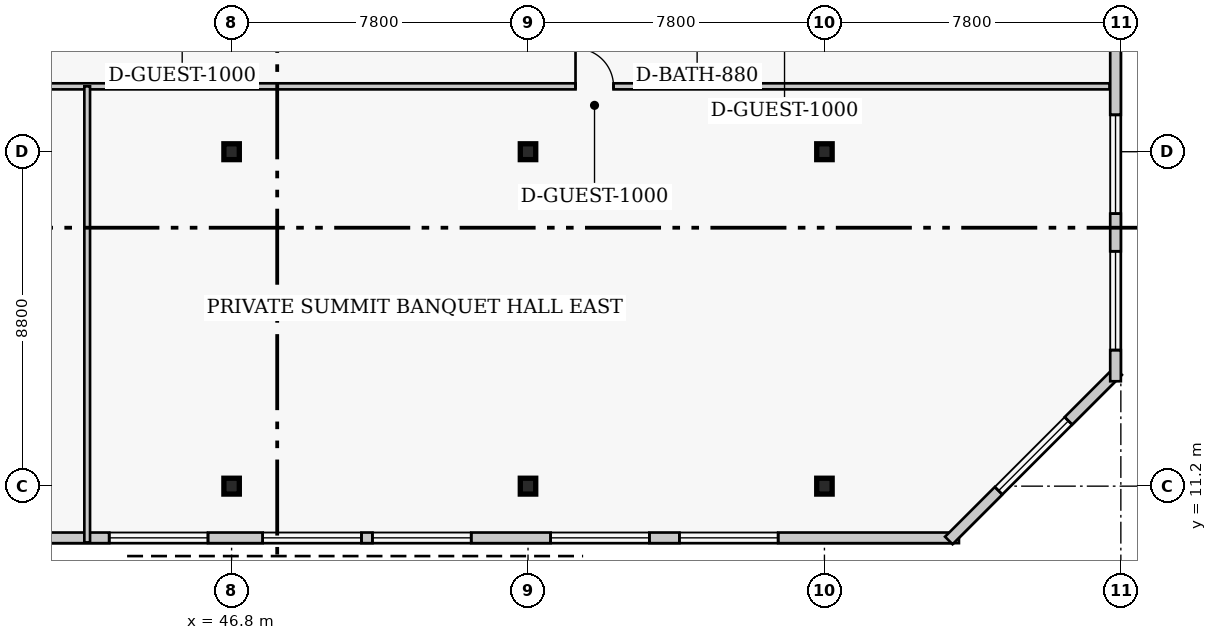
"""IFC4 building model, lengths in metres.
Left out: names, types, materials, properties, quantities, classifications, styles, units other than length and angle.
Written with IfcOpenShell. Run it as: python <this file> out.ifc"""

import sys

from ifc_helpers import new_model, si_unit, direction, frame, frame_2d, origin, origin_2d, place, context, subcontext, project, spatial, rectangle, i_section, extrude, element, fill, save


model = new_model("IFC4")
c1 = context("Model", 3, precision=1e-05, world=origin(), true_north=direction((0.0, 1.0)))
c2 = subcontext(c1, "Body", "Model", "MODEL_VIEW")
j1 = project(units=[si_unit("LENGTHUNIT", "METRE"), si_unit("PLANEANGLEUNIT", "RADIAN")], contexts=[c1])
p1 = place(None, origin())
s1 = spatial("IfcSite", under=j1, at=p1, CompositionType="ELEMENT")
p2 = place(p1, origin())
s2 = spatial("IfcBuilding", under=s1, at=p2, CompositionType="ELEMENT")
p3 = place(p2, frame((0.0, 0.0, 293.4)))
s3 = spatial("IfcBuildingStorey", under=s2, at=p3, CompositionType="ELEMENT", Elevation=293.4)
for number, where, z_axis, x_axis in (
    (1, (46.8, 11.2, 0.0), (0.0, 0.0, 1.0), (1.0, 0.0, 0.0)),
    (2, (46.8, 20.0, 0.0), (0.0, 0.0, 1.0), (1.0, 0.0, 0.0)),
    (3, (54.6, 11.2, 0.0), (0.0, 0.0, 1.0), (1.0, 0.0, 0.0)),
    (4, (54.6, 20.0, 0.0), (0.0, 0.0, 1.0), (1.0, 0.0, 0.0)),
    (5, (62.4, 11.2, 0.0), (0.0, 0.0, 1.0), (1.0, 0.0, 0.0)),
    (6, (62.4, 20.0, 0.0), (0.0, 0.0, 1.0), (1.0, 0.0, 0.0)),
):
    element("IfcColumn", number, at=place(p3, frame(where, z_axis=z_axis, x_axis=x_axis)), inside=s3, PredefinedType="COLUMN", context=c2, shape_type="SweptSolid", body=[
        extrude(i_section(OverallWidth=0.406, OverallDepth=0.417, WebThickness=0.03, FlangeThickness=0.048, FilletRadius=0.017, at=origin_2d()), origin(), (0.0, 0.0, 1.0), 4.0),
    ])
p4 = place(p3, frame((41.71, 9.84, 0.0), z_axis=(0.0, 0.0, 1.0), x_axis=(1.0, 0.0, 0.0)))
e7 = element("IfcWall", 7, at=p4, inside=s3, PredefinedType="SOLIDWALL", context=c2, shape_type="SweptSolid", body=[
    extrude(rectangle(XDim=24.23, YDim=0.28, at=frame_2d((12.115, 0.0))), origin(), (0.0, 0.0, 1.0), 3.71),
])
p5 = place(p4, frame((1.869, 0.0, 0.65)))
e8 = element("IfcOpeningElement", 8, at=p5, cuts=e7, PredefinedType="OPENING", context=c2, shape_type="SweptSolid", body=[
    extrude(rectangle(XDim=2.6, YDim=2.2, at=frame_2d((1.3, 1.1))), frame((0.0, 0.15, 0.0), z_axis=(0.0, -1.0, 0.0), x_axis=(1.0, 0.0, 0.0)), (0.0, 0.0, 1.0), 0.3),
])
p6 = place(p4, frame((5.907, 0.0, 0.65)))
e9 = element("IfcOpeningElement", 9, at=p6, cuts=e7, PredefinedType="OPENING", context=c2, shape_type="SweptSolid", body=[
    extrude(rectangle(XDim=2.6, YDim=2.2, at=frame_2d((1.3, 1.1))), frame((0.0, 0.15, 0.0), z_axis=(0.0, -1.0, 0.0), x_axis=(1.0, 0.0, 0.0)), (0.0, 0.0, 1.0), 0.3),
])
p7 = place(p4, frame((8.796, 0.0, 0.65)))
e10 = element("IfcOpeningElement", 10, at=p7, cuts=e7, PredefinedType="OPENING", context=c2, shape_type="SweptSolid", body=[
    extrude(rectangle(XDim=2.6, YDim=2.2, at=frame_2d((1.3, 1.1))), frame((0.0, 0.15, 0.0), z_axis=(0.0, -1.0, 0.0), x_axis=(1.0, 0.0, 0.0)), (0.0, 0.0, 1.0), 0.3),
])
p8 = place(p4, frame((13.484, 0.0, 0.65)))
e11 = element("IfcOpeningElement", 11, at=p8, cuts=e7, PredefinedType="OPENING", context=c2, shape_type="SweptSolid", body=[
    extrude(rectangle(XDim=2.6, YDim=2.2, at=frame_2d((1.3, 1.1))), frame((0.0, 0.15, 0.0), z_axis=(0.0, -1.0, 0.0), x_axis=(1.0, 0.0, 0.0)), (0.0, 0.0, 1.0), 0.3),
])
p9 = place(p4, frame((16.873, 0.0, 0.65)))
e12 = element("IfcOpeningElement", 12, at=p9, cuts=e7, PredefinedType="OPENING", context=c2, shape_type="SweptSolid", body=[
    extrude(rectangle(XDim=2.6, YDim=2.2, at=frame_2d((1.3, 1.1))), frame((0.0, 0.15, 0.0), z_axis=(0.0, -1.0, 0.0), x_axis=(1.0, 0.0, 0.0)), (0.0, 0.0, 1.0), 0.3),
])
p10 = place(p3, frame((65.673, 9.771, 0.0), z_axis=(0.0, 0.0, 1.0), x_axis=(0.707126148934, 0.707087412908, 0.0)))
e13 = element("IfcWall", 13, at=p10, inside=s3, PredefinedType="SOLIDWALL", context=c2, shape_type="SweptSolid", body=[
    extrude(rectangle(XDim=6.303, YDim=0.28, at=frame_2d((3.151, 0.0))), origin(), (0.0, 0.0, 1.0), 3.71),
])
p11 = place(p10, frame((1.851, 0.0, 0.65)))
e14 = element("IfcOpeningElement", 14, at=p11, cuts=e13, PredefinedType="OPENING", context=c2, shape_type="SweptSolid", body=[
    extrude(rectangle(XDim=2.6, YDim=2.2, at=frame_2d((1.3, 1.1))), frame((0.0, 0.15, 0.0), z_axis=(0.0, -1.0, 0.0), x_axis=(1.0, 0.0, 0.0)), (0.0, 0.0, 1.0), 0.3),
])
p12 = place(p3, frame((70.06, 13.96, 0.0), z_axis=(0.0, 0.0, 1.0), x_axis=(0.0, 1.0, 0.0)))
e15 = element("IfcWall", 15, at=p12, inside=s3, PredefinedType="SOLIDWALL", context=c2, shape_type="SweptSolid", body=[
    extrude(rectangle(XDim=29.68, YDim=0.28, at=frame_2d((14.84, 0.0))), origin(), (0.0, 0.0, 1.0), 3.71),
])
p13 = place(p12, frame((0.82, 0.0, 0.65)))
e16 = element("IfcOpeningElement", 16, at=p13, cuts=e15, PredefinedType="OPENING", context=c2, shape_type="SweptSolid", body=[
    extrude(rectangle(XDim=2.6, YDim=2.2, at=frame_2d((1.3, 1.1))), frame((0.0, 0.15, 0.0), z_axis=(0.0, -1.0, 0.0), x_axis=(1.0, 0.0, 0.0)), (0.0, 0.0, 1.0), 0.3),
])
p14 = place(p12, frame((4.41, 0.0, 0.65)))
e17 = element("IfcOpeningElement", 17, at=p14, cuts=e15, PredefinedType="OPENING", context=c2, shape_type="SweptSolid", body=[
    extrude(rectangle(XDim=2.6, YDim=2.2, at=frame_2d((1.3, 1.1))), frame((0.0, 0.15, 0.0), z_axis=(0.0, -1.0, 0.0), x_axis=(1.0, 0.0, 0.0)), (0.0, 0.0, 1.0), 0.3),
])
p15 = place(p12, frame((10.45, 0.0, 0.65)))
e18 = element("IfcOpeningElement", 18, at=p15, cuts=e15, PredefinedType="OPENING", context=c2, shape_type="SweptSolid", body=[
    extrude(rectangle(XDim=2.6, YDim=2.2, at=frame_2d((1.3, 1.1))), frame((0.0, 0.15, 0.0), z_axis=(0.0, -1.0, 0.0), x_axis=(1.0, 0.0, 0.0)), (0.0, 0.0, 1.0), 0.3),
])
p16 = place(p12, frame((13.54, 0.0, 0.65)))
e19 = element("IfcOpeningElement", 19, at=p16, cuts=e15, PredefinedType="OPENING", context=c2, shape_type="SweptSolid", body=[
    extrude(rectangle(XDim=2.6, YDim=2.2, at=frame_2d((1.3, 1.1))), frame((0.0, 0.15, 0.0), z_axis=(0.0, -1.0, 0.0), x_axis=(1.0, 0.0, 0.0)), (0.0, 0.0, 1.0), 0.3),
])
p17 = place(p12, frame((17.78, 0.0, 0.65)))
e20 = element("IfcOpeningElement", 20, at=p17, cuts=e15, PredefinedType="OPENING", context=c2, shape_type="SweptSolid", body=[
    extrude(rectangle(XDim=2.6, YDim=2.2, at=frame_2d((1.3, 1.1))), frame((0.0, 0.15, 0.0), z_axis=(0.0, -1.0, 0.0), x_axis=(1.0, 0.0, 0.0)), (0.0, 0.0, 1.0), 0.3),
])
p18 = place(p12, frame((22.02, 0.0, 0.65)))
e21 = element("IfcOpeningElement", 21, at=p18, cuts=e15, PredefinedType="OPENING", context=c2, shape_type="SweptSolid", body=[
    extrude(rectangle(XDim=2.6, YDim=2.2, at=frame_2d((1.3, 1.1))), frame((0.0, 0.15, 0.0), z_axis=(0.0, -1.0, 0.0), x_axis=(1.0, 0.0, 0.0)), (0.0, 0.0, 1.0), 0.3),
])
p19 = place(p12, frame((26.26, 0.0, 0.65)))
e22 = element("IfcOpeningElement", 22, at=p19, cuts=e15, PredefinedType="OPENING", context=c2, shape_type="SweptSolid", body=[
    extrude(rectangle(XDim=2.6, YDim=2.2, at=frame_2d((1.3, 1.1))), frame((0.0, 0.15, 0.0), z_axis=(0.0, -1.0, 0.0), x_axis=(1.0, 0.0, 0.0)), (0.0, 0.0, 1.0), 0.3),
])
p20 = place(p3, frame((8.1, 21.72, 0.0), z_axis=(0.0, 0.0, 1.0), x_axis=(1.0, 0.0, 0.0)))
e23 = element("IfcWall", 23, at=p20, inside=s3, PredefinedType="PARTITIONING", context=c2, shape_type="SweptSolid", body=[
    extrude(rectangle(XDim=61.8, YDim=0.16, at=frame_2d((30.9, 0.0))), origin(), (0.0, 0.0, 1.0), 3.71),
])
p21 = place(p20, frame((8.8, 0.0, 0.0)))
e24 = element("IfcOpeningElement", 24, at=p21, cuts=e23, PredefinedType="OPENING", context=c2, shape_type="SweptSolid", body=[
    extrude(rectangle(XDim=1.0, YDim=2.15, at=frame_2d((0.5, 1.075))), frame((0.0, 0.09, 0.0), z_axis=(0.0, -1.0, 0.0), x_axis=(1.0, 0.0, 0.0)), (0.0, 0.0, 1.0), 0.18),
])
p22 = place(p20, frame((26.15, 0.0, 0.0)))
e25 = element("IfcOpeningElement", 25, at=p22, cuts=e23, PredefinedType="OPENING", context=c2, shape_type="SweptSolid", body=[
    extrude(rectangle(XDim=1.0, YDim=2.15, at=frame_2d((0.5, 1.075))), frame((0.0, 0.09, 0.0), z_axis=(0.0, -1.0, 0.0), x_axis=(1.0, 0.0, 0.0)), (0.0, 0.0, 1.0), 0.18),
])
p23 = place(p20, frame((47.75, 0.0, 0.0)))
e26 = element("IfcOpeningElement", 26, at=p23, cuts=e23, PredefinedType="OPENING", context=c2, shape_type="SweptSolid", body=[
    extrude(rectangle(XDim=1.0, YDim=2.15, at=frame_2d((0.5, 1.075))), frame((0.0, 0.09, 0.0), z_axis=(0.0, -1.0, 0.0), x_axis=(1.0, 0.0, 0.0)), (0.0, 0.0, 1.0), 0.18),
])
p24 = place(p3, frame((43.0, 9.72, 0.0), z_axis=(0.0, 0.0, 1.0), x_axis=(0.0, 1.0, 0.0)))
e27 = element("IfcWall", 27, at=p24, inside=s3, PredefinedType="PARTITIONING", context=c2, shape_type="SweptSolid", body=[
    extrude(rectangle(XDim=12.0, YDim=0.15, at=frame_2d((6.0, 0.0))), origin(), (0.0, 0.0, 1.0), 3.71),
])
p25 = place(p5, origin())
e28 = element("IfcWindow", 28, at=p25, inside=s3, PartitioningType="SINGLE_PANEL", PredefinedType="WINDOW", context=c2, shape_type="SweptSolid", body=[
    extrude(rectangle(XDim=2.6, YDim=2.2, at=frame_2d((1.3, 1.1))), frame((0.0, 0.03, 0.0), z_axis=(0.0, -1.0, 0.0), x_axis=(1.0, 0.0, 0.0)), (0.0, 0.0, 1.0), 0.06),
])
fill(e8, e28)
p26 = place(p6, origin())
e29 = element("IfcWindow", 29, at=p26, inside=s3, PartitioningType="SINGLE_PANEL", PredefinedType="WINDOW", context=c2, shape_type="SweptSolid", body=[
    extrude(rectangle(XDim=2.6, YDim=2.2, at=frame_2d((1.3, 1.1))), frame((0.0, 0.03, 0.0), z_axis=(0.0, -1.0, 0.0), x_axis=(1.0, 0.0, 0.0)), (0.0, 0.0, 1.0), 0.06),
])
fill(e9, e29)
p27 = place(p7, origin())
e30 = element("IfcWindow", 30, at=p27, inside=s3, PartitioningType="SINGLE_PANEL", PredefinedType="WINDOW", context=c2, shape_type="SweptSolid", body=[
    extrude(rectangle(XDim=2.6, YDim=2.2, at=frame_2d((1.3, 1.1))), frame((0.0, 0.03, 0.0), z_axis=(0.0, -1.0, 0.0), x_axis=(1.0, 0.0, 0.0)), (0.0, 0.0, 1.0), 0.06),
])
fill(e10, e30)
p28 = place(p8, origin())
e31 = element("IfcWindow", 31, at=p28, inside=s3, PartitioningType="SINGLE_PANEL", PredefinedType="WINDOW", context=c2, shape_type="SweptSolid", body=[
    extrude(rectangle(XDim=2.6, YDim=2.2, at=frame_2d((1.3, 1.1))), frame((0.0, 0.03, 0.0), z_axis=(0.0, -1.0, 0.0), x_axis=(1.0, 0.0, 0.0)), (0.0, 0.0, 1.0), 0.06),
])
fill(e11, e31)
p29 = place(p9, origin())
e32 = element("IfcWindow", 32, at=p29, inside=s3, PartitioningType="SINGLE_PANEL", PredefinedType="WINDOW", context=c2, shape_type="SweptSolid", body=[
    extrude(rectangle(XDim=2.6, YDim=2.2, at=frame_2d((1.3, 1.1))), frame((0.0, 0.03, 0.0), z_axis=(0.0, -1.0, 0.0), x_axis=(1.0, 0.0, 0.0)), (0.0, 0.0, 1.0), 0.06),
])
fill(e12, e32)
p30 = place(p11, origin())
e33 = element("IfcWindow", 33, at=p30, inside=s3, PartitioningType="SINGLE_PANEL", PredefinedType="WINDOW", context=c2, shape_type="SweptSolid", body=[
    extrude(rectangle(XDim=2.6, YDim=2.2, at=frame_2d((1.3, 1.1))), frame((0.0, 0.03, 0.0), z_axis=(0.0, -1.0, 0.0), x_axis=(1.0, 0.0, 0.0)), (0.0, 0.0, 1.0), 0.06),
])
fill(e14, e33)
p31 = place(p13, origin())
e34 = element("IfcWindow", 34, at=p31, inside=s3, PartitioningType="SINGLE_PANEL", PredefinedType="WINDOW", context=c2, shape_type="SweptSolid", body=[
    extrude(rectangle(XDim=2.6, YDim=2.2, at=frame_2d((1.3, 1.1))), frame((0.0, 0.03, 0.0), z_axis=(0.0, -1.0, 0.0), x_axis=(1.0, 0.0, 0.0)), (0.0, 0.0, 1.0), 0.06),
])
fill(e16, e34)
p32 = place(p14, origin())
e35 = element("IfcWindow", 35, at=p32, inside=s3, PartitioningType="SINGLE_PANEL", PredefinedType="WINDOW", context=c2, shape_type="SweptSolid", body=[
    extrude(rectangle(XDim=2.6, YDim=2.2, at=frame_2d((1.3, 1.1))), frame((0.0, 0.03, 0.0), z_axis=(0.0, -1.0, 0.0), x_axis=(1.0, 0.0, 0.0)), (0.0, 0.0, 1.0), 0.06),
])
fill(e17, e35)
p33 = place(p23, origin())
e36 = element("IfcDoor", 36, at=p33, inside=s3, OperationType="SINGLE_SWING_LEFT", PredefinedType="DOOR", context=c2, shape_type="SweptSolid", body=[
    extrude(rectangle(XDim=1.0, YDim=2.15, at=frame_2d((0.5, 1.075))), frame((0.0, 0.025, 0.0), z_axis=(0.0, -1.0, 0.0), x_axis=(1.0, 0.0, 0.0)), (0.0, 0.0, 1.0), 0.05),
])
fill(e26, e36)
save(model, sys.argv[1])
